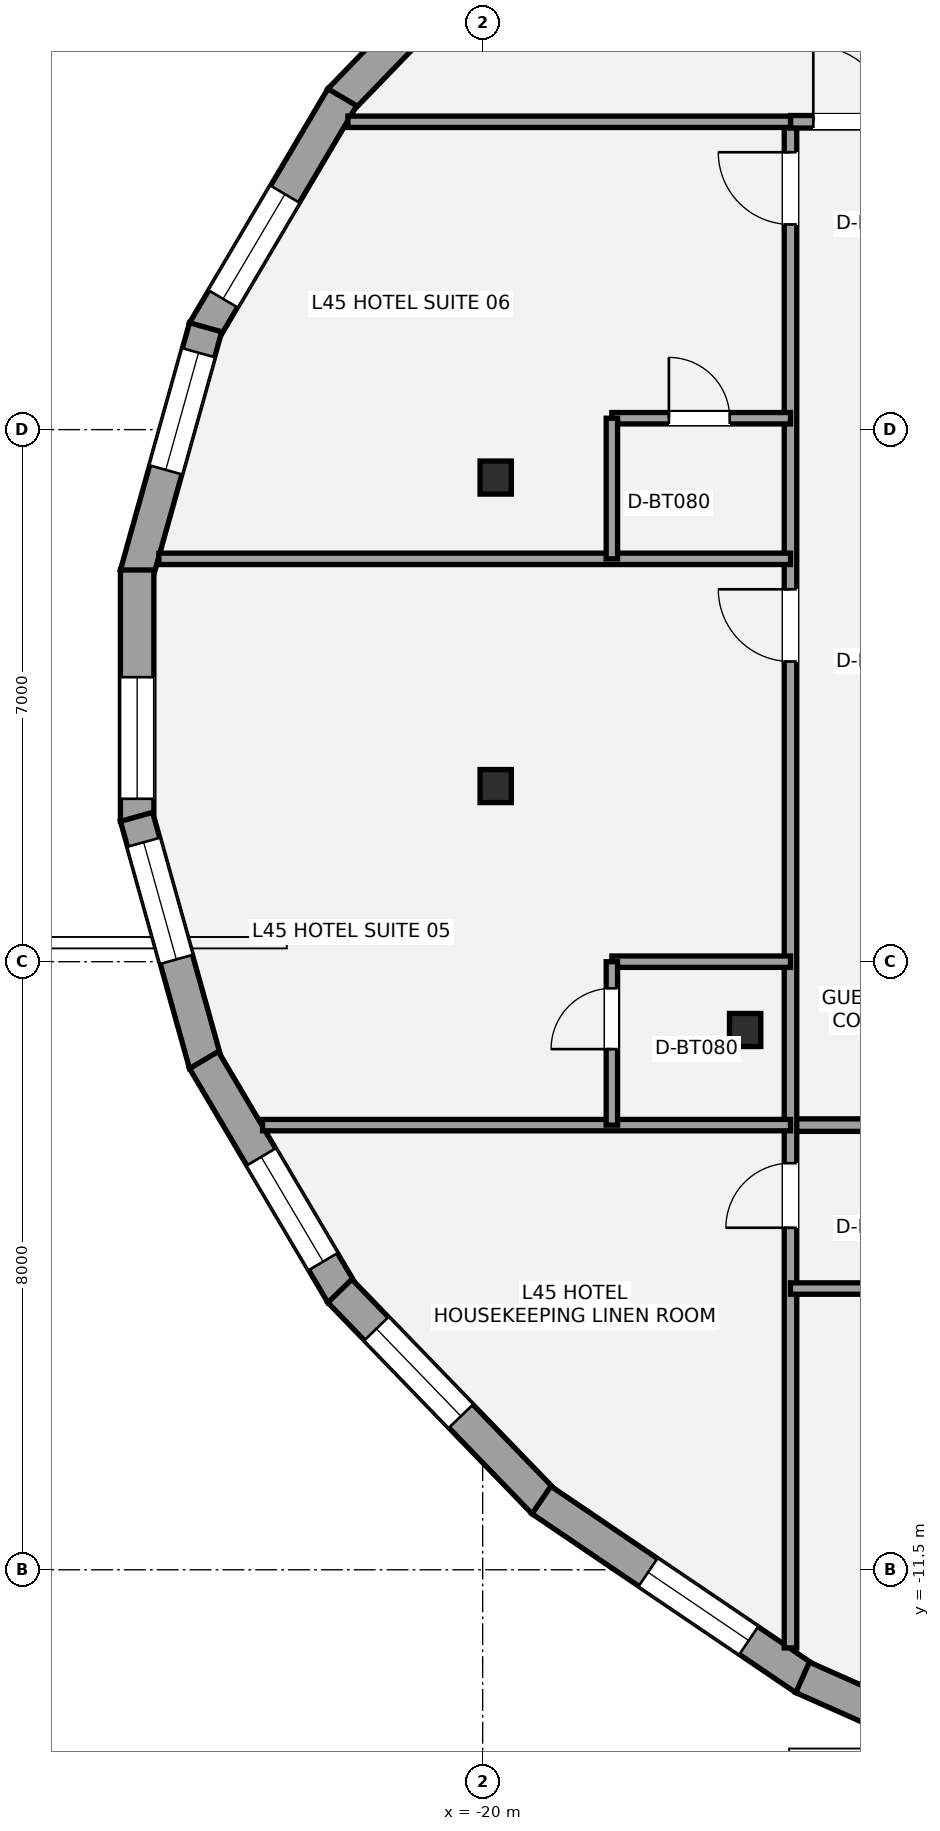
"""IFC4 building model, lengths in metres.
Left out: names, types, materials, properties, quantities, classifications, styles, units other than length and angle.
Written with IfcOpenShell. Run it as: python <this file> out.ifc"""

import sys

from ifc_helpers import new_model, si_unit, direction, frame, frame_2d, origin, origin_2d, place, context, subcontext, project, spatial, rectangle, i_section, extrude, element, fill, save


model = new_model("IFC4")
c1 = context("Model", 3, precision=1e-05, world=origin(), true_north=direction((0.0, 1.0)))
c2 = subcontext(c1, "Body", "Model", "MODEL_VIEW")
j1 = project(units=[si_unit("LENGTHUNIT", "METRE"), si_unit("PLANEANGLEUNIT", "RADIAN")], contexts=[c1])
p1 = place(None, origin())
s1 = spatial("IfcSite", under=j1, at=p1, CompositionType="ELEMENT")
p2 = place(p1, origin())
s2 = spatial("IfcBuilding", under=s1, at=p2, CompositionType="ELEMENT")
p3 = place(p2, frame((0.0, 0.0, 166.2)))
s3 = spatial("IfcBuildingStorey", under=s2, at=p3, CompositionType="ELEMENT", Elevation=166.2)
for number, where, z_axis, x_axis in (
    (1, (-19.828, 2.869, 0.0), (0.0, 0.0, 1.0), (1.0, 0.0, 0.0)),
    (2, (-19.828, -1.189, 0.0), (0.0, 0.0, 1.0), (1.0, 0.0, 0.0)),
    (3, (-16.547, -4.398, 0.0), (0.0, 0.0, 1.0), (1.0, 0.0, 0.0)),
):
    element("IfcColumn", number, at=place(p3, frame(where, z_axis=z_axis, x_axis=x_axis)), inside=s3, PredefinedType="COLUMN", context=c2, shape_type="SweptSolid", body=[
        extrude(i_section(OverallWidth=0.412, OverallDepth=0.435, WebThickness=0.036, FlangeThickness=0.057, at=origin_2d()), origin(), (0.0, 0.0, 1.0), 3.2),
    ])
p4 = place(p3, frame((-21.879, 7.832, 0.0), z_axis=(0.0, 0.0, 1.0), x_axis=(0.694975307772, 0.719033602544, 0.0)))
e4 = element("IfcWall", 4, at=p4, inside=s3, PredefinedType="STANDARD", context=c2, shape_type="SweptSolid", body=[
    extrude(rectangle(XDim=3.866, YDim=0.44, at=frame_2d((1.933, 0.0))), origin(), (0.0, 0.0, 1.0), 2.315),
])
p5 = place(p4, frame((1.575, 0.0, 0.58)))
e5 = element("IfcOpeningElement", 5, at=p5, cuts=e4, PredefinedType="OPENING", context=c2, shape_type="SweptSolid", body=[
    extrude(rectangle(XDim=1.6, YDim=1.55, at=frame_2d((0.8, 0.775))), frame((0.0, 0.23, 0.0), z_axis=(0.0, -1.0, 0.0), x_axis=(1.0, 0.0, 0.0)), (0.0, 0.0, 1.0), 0.46),
])
p6 = place(p3, frame((-23.667, 4.794, 0.0), z_axis=(0.0, 0.0, 1.0), x_axis=(0.508883387051, 0.860835465338, 0.0)))
e6 = element("IfcWall", 6, at=p6, inside=s3, PredefinedType="STANDARD", context=c2, shape_type="SweptSolid", body=[
    extrude(rectangle(XDim=3.577, YDim=0.44, at=frame_2d((1.788, 0.0))), origin(), (0.0, 0.0, 1.0), 2.315),
])
p7 = place(p6, frame((0.496, 0.0, 0.58)))
e7 = element("IfcOpeningElement", 7, at=p7, cuts=e6, PredefinedType="OPENING", context=c2, shape_type="SweptSolid", body=[
    extrude(rectangle(XDim=1.6, YDim=1.55, at=frame_2d((0.8, 0.775))), frame((0.0, 0.23, 0.0), z_axis=(0.0, -1.0, 0.0), x_axis=(1.0, 0.0, 0.0)), (0.0, 0.0, 1.0), 0.46),
])
p8 = place(p3, frame((-24.554, 1.594, 0.0), z_axis=(0.0, 0.0, 1.0), x_axis=(0.269235699479, 0.963074315993, 0.0)))
e8 = element("IfcWall", 8, at=p8, inside=s3, PredefinedType="STANDARD", context=c2, shape_type="SweptSolid", body=[
    extrude(rectangle(XDim=3.377, YDim=0.44, at=frame_2d((1.688, 0.0))), origin(), (0.0, 0.0, 1.0), 2.315),
])
p9 = place(p8, frame((1.429, 0.0, 0.58)))
e9 = element("IfcOpeningElement", 9, at=p9, cuts=e8, PredefinedType="OPENING", context=c2, shape_type="SweptSolid", body=[
    extrude(rectangle(XDim=1.6, YDim=1.55, at=frame_2d((0.8, 0.775))), frame((0.0, 0.23, 0.0), z_axis=(0.0, -1.0, 0.0), x_axis=(1.0, 0.0, 0.0)), (0.0, 0.0, 1.0), 0.46),
])
p10 = place(p3, frame((-24.546, -1.654, 0.0), z_axis=(0.0, 0.0, 1.0), x_axis=(0.0, 1.0, 0.0)))
e10 = element("IfcWall", 10, at=p10, inside=s3, PredefinedType="STANDARD", context=c2, shape_type="SweptSolid", body=[
    extrude(rectangle(XDim=3.307, YDim=0.44, at=frame_2d((1.654, 0.0))), origin(), (0.0, 0.0, 1.0), 2.315),
])
p11 = place(p10, frame((0.297, 0.0, 0.58)))
e11 = element("IfcOpeningElement", 11, at=p11, cuts=e10, PredefinedType="OPENING", context=c2, shape_type="SweptSolid", body=[
    extrude(rectangle(XDim=1.6, YDim=1.55, at=frame_2d((0.8, 0.775))), frame((0.0, 0.23, 0.0), z_axis=(0.0, -1.0, 0.0), x_axis=(1.0, 0.0, 0.0)), (0.0, 0.0, 1.0), 0.46),
])
p12 = place(p3, frame((-23.645, -4.846, 0.0), z_axis=(0.0, 0.0, 1.0), x_axis=(-0.269235699479, 0.963074315993, 0.0)))
e12 = element("IfcWall", 12, at=p12, inside=s3, PredefinedType="STANDARD", context=c2, shape_type="SweptSolid", body=[
    extrude(rectangle(XDim=3.377, YDim=0.44, at=frame_2d((1.688, 0.0))), origin(), (0.0, 0.0, 1.0), 2.315),
])
p13 = place(p12, frame((1.429, 0.0, 0.58)))
e13 = element("IfcOpeningElement", 13, at=p13, cuts=e12, PredefinedType="OPENING", context=c2, shape_type="SweptSolid", body=[
    extrude(rectangle(XDim=1.6, YDim=1.55, at=frame_2d((0.8, 0.775))), frame((0.0, 0.23, 0.0), z_axis=(0.0, -1.0, 0.0), x_axis=(1.0, 0.0, 0.0)), (0.0, 0.0, 1.0), 0.46),
])
p14 = place(p3, frame((-21.847, -7.873, 0.0), z_axis=(0.0, 0.0, 1.0), x_axis=(-0.508883387051, 0.860835465338, 0.0)))
e14 = element("IfcWall", 14, at=p14, inside=s3, PredefinedType="STANDARD", context=c2, shape_type="SweptSolid", body=[
    extrude(rectangle(XDim=3.577, YDim=0.44, at=frame_2d((1.788, 0.0))), origin(), (0.0, 0.0, 1.0), 2.315),
])
p15 = place(p14, frame((0.496, 0.0, 0.58)))
e15 = element("IfcOpeningElement", 15, at=p15, cuts=e14, PredefinedType="OPENING", context=c2, shape_type="SweptSolid", body=[
    extrude(rectangle(XDim=1.6, YDim=1.55, at=frame_2d((0.8, 0.775))), frame((0.0, 0.23, 0.0), z_axis=(0.0, -1.0, 0.0), x_axis=(1.0, 0.0, 0.0)), (0.0, 0.0, 1.0), 0.46),
])
p16 = place(p3, frame((-19.192, -10.612, 0.0), z_axis=(0.0, 0.0, 1.0), x_axis=(-0.694975307772, 0.719033602544, 0.0)))
e16 = element("IfcWall", 16, at=p16, inside=s3, PredefinedType="STANDARD", context=c2, shape_type="SweptSolid", body=[
    extrude(rectangle(XDim=3.866, YDim=0.44, at=frame_2d((1.933, 0.0))), origin(), (0.0, 0.0, 1.0), 2.315),
])
p17 = place(p16, frame((1.575, 0.0, 0.58)))
e17 = element("IfcOpeningElement", 17, at=p17, cuts=e16, PredefinedType="OPENING", context=c2, shape_type="SweptSolid", body=[
    extrude(rectangle(XDim=1.6, YDim=1.55, at=frame_2d((0.8, 0.775))), frame((0.0, 0.23, 0.0), z_axis=(0.0, -1.0, 0.0), x_axis=(1.0, 0.0, 0.0)), (0.0, 0.0, 1.0), 0.46),
])
p18 = place(p3, frame((-15.757, -12.935, 0.0), z_axis=(0.0, 0.0, 1.0), x_axis=(-0.827760762475, 0.561081206338, 0.0)))
e18 = element("IfcWall", 18, at=p18, inside=s3, PredefinedType="STANDARD", context=c2, shape_type="SweptSolid", body=[
    extrude(rectangle(XDim=4.192, YDim=0.44, at=frame_2d((2.096, 0.0))), origin(), (0.0, 0.0, 1.0), 2.315),
])
p19 = place(p18, frame((0.897, 0.0, 0.58)))
e19 = element("IfcOpeningElement", 19, at=p19, cuts=e18, PredefinedType="OPENING", context=c2, shape_type="SweptSolid", body=[
    extrude(rectangle(XDim=1.6, YDim=1.55, at=frame_2d((0.8, 0.775))), frame((0.0, 0.23, 0.0), z_axis=(0.0, -1.0, 0.0), x_axis=(1.0, 0.0, 0.0)), (0.0, 0.0, 1.0), 0.46),
])
p20 = place(p3, frame((-11.69, -14.737, 0.0), z_axis=(0.0, 0.0, 1.0), x_axis=(-0.913907994914, 0.405921392431, 0.0)))
e20 = element("IfcWall", 20, at=p20, inside=s3, PredefinedType="STANDARD", context=c2, shape_type="SweptSolid", body=[
    extrude(rectangle(XDim=4.487, YDim=0.44, at=frame_2d((2.244, 0.0))), origin(), (0.0, 0.0, 1.0), 2.315),
])
p21 = place(p20, frame((1.742, 0.0, 0.58)))
e21 = element("IfcOpeningElement", 21, at=p21, cuts=e20, PredefinedType="OPENING", context=c2, shape_type="SweptSolid", body=[
    extrude(rectangle(XDim=1.6, YDim=1.55, at=frame_2d((0.8, 0.775))), frame((0.0, 0.23, 0.0), z_axis=(0.0, -1.0, 0.0), x_axis=(1.0, 0.0, 0.0)), (0.0, 0.0, 1.0), 0.46),
])
p22 = place(p3, frame((-15.95, -5.65, 0.0), z_axis=(0.0, 0.0, 1.0), x_axis=(1.0, 0.0, 0.0)))
e22 = element("IfcWall", 22, at=p22, inside=s3, PredefinedType="PARTITIONING", context=c2, shape_type="SweptSolid", body=[
    extrude(rectangle(XDim=31.5, YDim=0.165, at=frame_2d((15.75, 0.0))), origin(), (0.0, 0.0, 1.0), 2.398),
])
p23 = place(p22, frame((4.8, 0.0, 0.0)))
e23 = element("IfcOpeningElement", 23, at=p23, cuts=e22, PredefinedType="OPENING", context=c2, shape_type="SweptSolid", body=[
    extrude(rectangle(XDim=0.95, YDim=2.15, at=frame_2d((0.475, 1.075))), frame((0.0, 0.093, 0.0), z_axis=(0.0, -1.0, 0.0), x_axis=(1.0, 0.0, 0.0)), (0.0, 0.0, 1.0), 0.185),
])
p24 = place(p22, frame((12.8, 0.0, 0.0)))
e24 = element("IfcOpeningElement", 24, at=p24, cuts=e22, PredefinedType="OPENING", context=c2, shape_type="SweptSolid", body=[
    extrude(rectangle(XDim=0.95, YDim=2.15, at=frame_2d((0.475, 1.075))), frame((0.0, 0.093, 0.0), z_axis=(0.0, -1.0, 0.0), x_axis=(1.0, 0.0, 0.0)), (0.0, 0.0, 1.0), 0.185),
])
p25 = place(p22, frame((20.8, 0.0, 0.0)))
e25 = element("IfcOpeningElement", 25, at=p25, cuts=e22, PredefinedType="OPENING", context=c2, shape_type="SweptSolid", body=[
    extrude(rectangle(XDim=0.95, YDim=2.15, at=frame_2d((0.475, 1.075))), frame((0.0, 0.093, 0.0), z_axis=(0.0, -1.0, 0.0), x_axis=(1.0, 0.0, 0.0)), (0.0, 0.0, 1.0), 0.185),
])
p26 = place(p22, frame((30.15, 0.0, 0.0)))
e26 = element("IfcOpeningElement", 26, at=p26, cuts=e22, PredefinedType="OPENING", context=c2, shape_type="SweptSolid", body=[
    extrude(rectangle(XDim=0.95, YDim=2.15, at=frame_2d((0.475, 1.075))), frame((0.0, 0.093, 0.0), z_axis=(0.0, -1.0, 0.0), x_axis=(1.0, 0.0, 0.0)), (0.0, 0.0, 1.0), 0.185),
])
p27 = place(p3, frame((-15.95, -12.528, 0.0), z_axis=(0.0, 0.0, 1.0), x_axis=(0.0, 1.0, 0.0)))
e27 = element("IfcWall", 27, at=p27, inside=s3, PredefinedType="PARTITIONING", context=c2, shape_type="SweptSolid", body=[
    extrude(rectangle(XDim=20.078, YDim=0.165, at=frame_2d((10.039, 0.0))), origin(), (0.0, 0.0, 1.0), 2.473),
])
p28 = place(p27, frame((5.528, 0.0, 0.0)))
e28 = element("IfcOpeningElement", 28, at=p28, cuts=e27, PredefinedType="OPENING", context=c2, shape_type="SweptSolid", body=[
    extrude(rectangle(XDim=0.85, YDim=2.1, at=frame_2d((0.425, 1.05))), frame((0.0, 0.093, 0.0), z_axis=(0.0, -1.0, 0.0), x_axis=(1.0, 0.0, 0.0)), (0.0, 0.0, 1.0), 0.185),
])
p29 = place(p27, frame((12.978, 0.0, 0.0)))
e29 = element("IfcOpeningElement", 29, at=p29, cuts=e27, PredefinedType="OPENING", context=c2, shape_type="SweptSolid", body=[
    extrude(rectangle(XDim=0.95, YDim=2.15, at=frame_2d((0.475, 1.075))), frame((0.0, 0.093, 0.0), z_axis=(0.0, -1.0, 0.0), x_axis=(1.0, 0.0, 0.0)), (0.0, 0.0, 1.0), 0.185),
])
p30 = place(p27, frame((18.728, 0.0, 0.0)))
e30 = element("IfcOpeningElement", 30, at=p30, cuts=e27, PredefinedType="OPENING", context=c2, shape_type="SweptSolid", body=[
    extrude(rectangle(XDim=0.95, YDim=2.15, at=frame_2d((0.475, 1.075))), frame((0.0, 0.093, 0.0), z_axis=(0.0, -1.0, 0.0), x_axis=(1.0, 0.0, 0.0)), (0.0, 0.0, 1.0), 0.185),
])
p31 = place(p3, frame((-15.95, 7.55, 0.0), z_axis=(0.0, 0.0, 1.0), x_axis=(1.0, 0.0, 0.0)))
e31 = element("IfcWall", 31, at=p31, inside=s3, PredefinedType="PARTITIONING", context=c2, shape_type="SweptSolid", body=[
    extrude(rectangle(XDim=2.15, YDim=0.165, at=frame_2d((1.075, 0.0))), origin(), (0.0, 0.0, 1.0), 3.02),
])
p32 = place(p31, frame((0.3, 0.0, 0.0)))
e32 = element("IfcOpeningElement", 32, at=p32, cuts=e31, PredefinedType="OPENING", context=c2, shape_type="SweptSolid", body=[
    extrude(rectangle(XDim=1.0, YDim=2.15, at=frame_2d((0.5, 1.075))), frame((0.0, 0.093, 0.0), z_axis=(0.0, -1.0, 0.0), x_axis=(1.0, 0.0, 0.0)), (0.0, 0.0, 1.0), 0.185),
])
p33 = place(p3, frame((-21.773, 7.55, 0.0), z_axis=(0.0, 0.0, 1.0), x_axis=(1.0, 0.0, 0.0)))
e33 = element("IfcWall", 33, at=p33, inside=s3, PredefinedType="PLUMBINGWALL", context=c2, shape_type="SweptSolid", body=[
    extrude(rectangle(XDim=5.823, YDim=0.15, at=frame_2d((2.912, 0.0))), origin(), (0.0, 0.0, 1.0), 2.473),
])
p34 = place(p3, frame((-22.896, -5.65, 0.0), z_axis=(0.0, 0.0, 1.0), x_axis=(1.0, 0.0, 0.0)))
e34 = element("IfcWall", 34, at=p34, inside=s3, PredefinedType="PLUMBINGWALL", context=c2, shape_type="SweptSolid", body=[
    extrude(rectangle(XDim=6.947, YDim=0.15, at=frame_2d((3.473, 0.0))), origin(), (0.0, 0.0, 1.0), 2.473),
])
p35 = place(p3, frame((-15.95, -7.8, 0.0), z_axis=(0.0, 0.0, 1.0), x_axis=(1.0, 0.0, 0.0)))
e35 = element("IfcWall", 35, at=p35, inside=s3, PredefinedType="PLUMBINGWALL", context=c2, shape_type="SweptSolid", body=[
    extrude(rectangle(XDim=1.85, YDim=0.15, at=frame_2d((0.925, 0.0))), origin(), (0.0, 0.0, 1.0), 3.02),
])
p36 = place(p3, frame((-24.26, 1.8, 0.0), z_axis=(0.0, 0.0, 1.0), x_axis=(1.0, 0.0, 0.0)))
e36 = element("IfcWall", 36, at=p36, inside=s3, PredefinedType="PLUMBINGWALL", context=c2, shape_type="SweptSolid", body=[
    extrude(rectangle(XDim=8.31, YDim=0.15, at=frame_2d((4.155, 0.0))), origin(), (0.0, 0.0, 1.0), 2.473),
])
p37 = place(p3, frame((-18.3, -3.5, 0.0), z_axis=(0.0, 0.0, 1.0), x_axis=(1.0, 0.0, 0.0)))
e37 = element("IfcWall", 37, at=p37, inside=s3, PredefinedType="PLUMBINGWALL", context=c2, shape_type="SweptSolid", body=[
    extrude(rectangle(XDim=2.35, YDim=0.15, at=frame_2d((1.175, 0.0))), origin(), (0.0, 0.0, 1.0), 2.398),
])
p38 = place(p3, frame((-18.3, -5.65, 0.0), z_axis=(0.0, 0.0, 1.0), x_axis=(0.0, 1.0, 0.0)))
e38 = element("IfcWall", 38, at=p38, inside=s3, PredefinedType="PLUMBINGWALL", context=c2, shape_type="SweptSolid", body=[
    extrude(rectangle(XDim=2.15, YDim=0.15, at=frame_2d((1.075, 0.0))), origin(), (0.0, 0.0, 1.0), 2.473),
])
p39 = place(p38, frame((1.0, 0.0, 0.0)))
e39 = element("IfcOpeningElement", 39, at=p39, cuts=e38, PredefinedType="OPENING", context=c2, shape_type="SweptSolid", body=[
    extrude(rectangle(XDim=0.8, YDim=2.1, at=frame_2d((0.4, 1.05))), frame((0.0, 0.085, 0.0), z_axis=(0.0, -1.0, 0.0), x_axis=(1.0, 0.0, 0.0)), (0.0, 0.0, 1.0), 0.17),
])
p40 = place(p3, frame((-18.3, 3.65, 0.0), z_axis=(0.0, 0.0, 1.0), x_axis=(1.0, 0.0, 0.0)))
e40 = element("IfcWall", 40, at=p40, inside=s3, PredefinedType="PLUMBINGWALL", context=c2, shape_type="SweptSolid", body=[
    extrude(rectangle(XDim=2.35, YDim=0.15, at=frame_2d((1.175, 0.0))), origin(), (0.0, 0.0, 1.0), 3.02),
])
p41 = place(p40, frame((0.75, 0.0, 0.0)))
e41 = element("IfcOpeningElement", 41, at=p41, cuts=e40, PredefinedType="OPENING", context=c2, shape_type="SweptSolid", body=[
    extrude(rectangle(XDim=0.8, YDim=2.1, at=frame_2d((0.4, 1.05))), frame((0.0, 0.085, 0.0), z_axis=(0.0, -1.0, 0.0), x_axis=(1.0, 0.0, 0.0)), (0.0, 0.0, 1.0), 0.17),
])
p42 = place(p3, frame((-18.3, 1.8, 0.0), z_axis=(0.0, 0.0, 1.0), x_axis=(0.0, 1.0, 0.0)))
e42 = element("IfcWall", 42, at=p42, inside=s3, PredefinedType="PLUMBINGWALL", context=c2, shape_type="SweptSolid", body=[
    extrude(rectangle(XDim=1.85, YDim=0.15, at=frame_2d((0.925, 0.0))), origin(), (0.0, 0.0, 1.0), 3.02),
])
p43 = place(p7, origin())
e43 = element("IfcWindow", 43, at=p43, inside=s3, PartitioningType="SINGLE_PANEL", PredefinedType="WINDOW", context=c2, shape_type="SweptSolid", body=[
    extrude(rectangle(XDim=1.6, YDim=1.55, at=frame_2d((0.8, 0.775))), frame((0.0, -0.01, 0.0), z_axis=(0.0, -1.0, 0.0), x_axis=(1.0, 0.0, 0.0)), (0.0, 0.0, 1.0), 0.06),
])
fill(e7, e43)
p44 = place(p9, origin())
e44 = element("IfcWindow", 44, at=p44, inside=s3, PartitioningType="SINGLE_PANEL", PredefinedType="WINDOW", context=c2, shape_type="SweptSolid", body=[
    extrude(rectangle(XDim=1.6, YDim=1.55, at=frame_2d((0.8, 0.775))), frame((0.0, -0.01, 0.0), z_axis=(0.0, -1.0, 0.0), x_axis=(1.0, 0.0, 0.0)), (0.0, 0.0, 1.0), 0.06),
])
fill(e9, e44)
p45 = place(p11, origin())
e45 = element("IfcWindow", 45, at=p45, inside=s3, PartitioningType="SINGLE_PANEL", PredefinedType="WINDOW", context=c2, shape_type="SweptSolid", body=[
    extrude(rectangle(XDim=1.6, YDim=1.55, at=frame_2d((0.8, 0.775))), frame((0.0, -0.01, 0.0), z_axis=(0.0, -1.0, 0.0), x_axis=(1.0, 0.0, 0.0)), (0.0, 0.0, 1.0), 0.06),
])
fill(e11, e45)
p46 = place(p13, origin())
e46 = element("IfcWindow", 46, at=p46, inside=s3, PartitioningType="SINGLE_PANEL", PredefinedType="WINDOW", context=c2, shape_type="SweptSolid", body=[
    extrude(rectangle(XDim=1.6, YDim=1.55, at=frame_2d((0.8, 0.775))), frame((0.0, -0.01, 0.0), z_axis=(0.0, -1.0, 0.0), x_axis=(1.0, 0.0, 0.0)), (0.0, 0.0, 1.0), 0.06),
])
fill(e13, e46)
p47 = place(p15, origin())
e47 = element("IfcWindow", 47, at=p47, inside=s3, PartitioningType="SINGLE_PANEL", PredefinedType="WINDOW", context=c2, shape_type="SweptSolid", body=[
    extrude(rectangle(XDim=1.6, YDim=1.55, at=frame_2d((0.8, 0.775))), frame((0.0, -0.01, 0.0), z_axis=(0.0, -1.0, 0.0), x_axis=(1.0, 0.0, 0.0)), (0.0, 0.0, 1.0), 0.06),
])
fill(e15, e47)
p48 = place(p17, origin())
e48 = element("IfcWindow", 48, at=p48, inside=s3, PartitioningType="SINGLE_PANEL", PredefinedType="WINDOW", context=c2, shape_type="SweptSolid", body=[
    extrude(rectangle(XDim=1.6, YDim=1.55, at=frame_2d((0.8, 0.775))), frame((0.0, -0.01, 0.0), z_axis=(0.0, -1.0, 0.0), x_axis=(1.0, 0.0, 0.0)), (0.0, 0.0, 1.0), 0.06),
])
fill(e17, e48)
p49 = place(p19, origin())
e49 = element("IfcWindow", 49, at=p49, inside=s3, PartitioningType="SINGLE_PANEL", PredefinedType="WINDOW", context=c2, shape_type="SweptSolid", body=[
    extrude(rectangle(XDim=1.6, YDim=1.55, at=frame_2d((0.8, 0.775))), frame((0.0, -0.01, 0.0), z_axis=(0.0, -1.0, 0.0), x_axis=(1.0, 0.0, 0.0)), (0.0, 0.0, 1.0), 0.06),
])
fill(e19, e49)
p50 = place(p32, origin())
e50 = element("IfcDoor", 50, at=p50, inside=s3, OperationType="SINGLE_SWING_LEFT", PredefinedType="DOOR", context=c2, shape_type="SweptSolid", body=[
    extrude(rectangle(XDim=1.0, YDim=2.15, at=frame_2d((0.5, 1.075))), frame((0.0, 0.025, 0.0), z_axis=(0.0, -1.0, 0.0), x_axis=(1.0, 0.0, 0.0)), (0.0, 0.0, 1.0), 0.05),
])
fill(e32, e50)
p51 = place(p28, origin())
e51 = element("IfcDoor", 51, at=p51, inside=s3, OperationType="SINGLE_SWING_LEFT", PredefinedType="DOOR", context=c2, shape_type="SweptSolid", body=[
    extrude(rectangle(XDim=0.85, YDim=2.1, at=frame_2d((0.425, 1.05))), frame((0.0, 0.025, 0.0), z_axis=(0.0, -1.0, 0.0), x_axis=(1.0, 0.0, 0.0)), (0.0, 0.0, 1.0), 0.05),
])
fill(e28, e51)
p52 = place(p29, origin())
e52 = element("IfcDoor", 52, at=p52, inside=s3, OperationType="SINGLE_SWING_RIGHT", PredefinedType="DOOR", context=c2, shape_type="SweptSolid", body=[
    extrude(rectangle(XDim=0.95, YDim=2.15, at=frame_2d((0.475, 1.075))), frame((0.0, 0.025, 0.0), z_axis=(0.0, -1.0, 0.0), x_axis=(1.0, 0.0, 0.0)), (0.0, 0.0, 1.0), 0.05),
])
fill(e29, e52)
p53 = place(p39, origin())
e53 = element("IfcDoor", 53, at=p53, inside=s3, OperationType="SINGLE_SWING_LEFT", PredefinedType="DOOR", context=c2, shape_type="SweptSolid", body=[
    extrude(rectangle(XDim=0.8, YDim=2.1, at=frame_2d((0.4, 1.05))), frame((0.0, 0.025, 0.0), z_axis=(0.0, -1.0, 0.0), x_axis=(1.0, 0.0, 0.0)), (0.0, 0.0, 1.0), 0.05),
])
fill(e39, e53)
p54 = place(p30, origin())
e54 = element("IfcDoor", 54, at=p54, inside=s3, OperationType="SINGLE_SWING_RIGHT", PredefinedType="DOOR", context=c2, shape_type="SweptSolid", body=[
    extrude(rectangle(XDim=0.95, YDim=2.15, at=frame_2d((0.475, 1.075))), frame((0.0, 0.025, 0.0), z_axis=(0.0, -1.0, 0.0), x_axis=(1.0, 0.0, 0.0)), (0.0, 0.0, 1.0), 0.05),
])
fill(e30, e54)
p55 = place(p41, origin())
e55 = element("IfcDoor", 55, at=p55, inside=s3, OperationType="SINGLE_SWING_LEFT", PredefinedType="DOOR", context=c2, shape_type="SweptSolid", body=[
    extrude(rectangle(XDim=0.8, YDim=2.1, at=frame_2d((0.4, 1.05))), frame((0.0, 0.025, 0.0), z_axis=(0.0, -1.0, 0.0), x_axis=(1.0, 0.0, 0.0)), (0.0, 0.0, 1.0), 0.05),
])
fill(e41, e55)
save(model, sys.argv[1])
